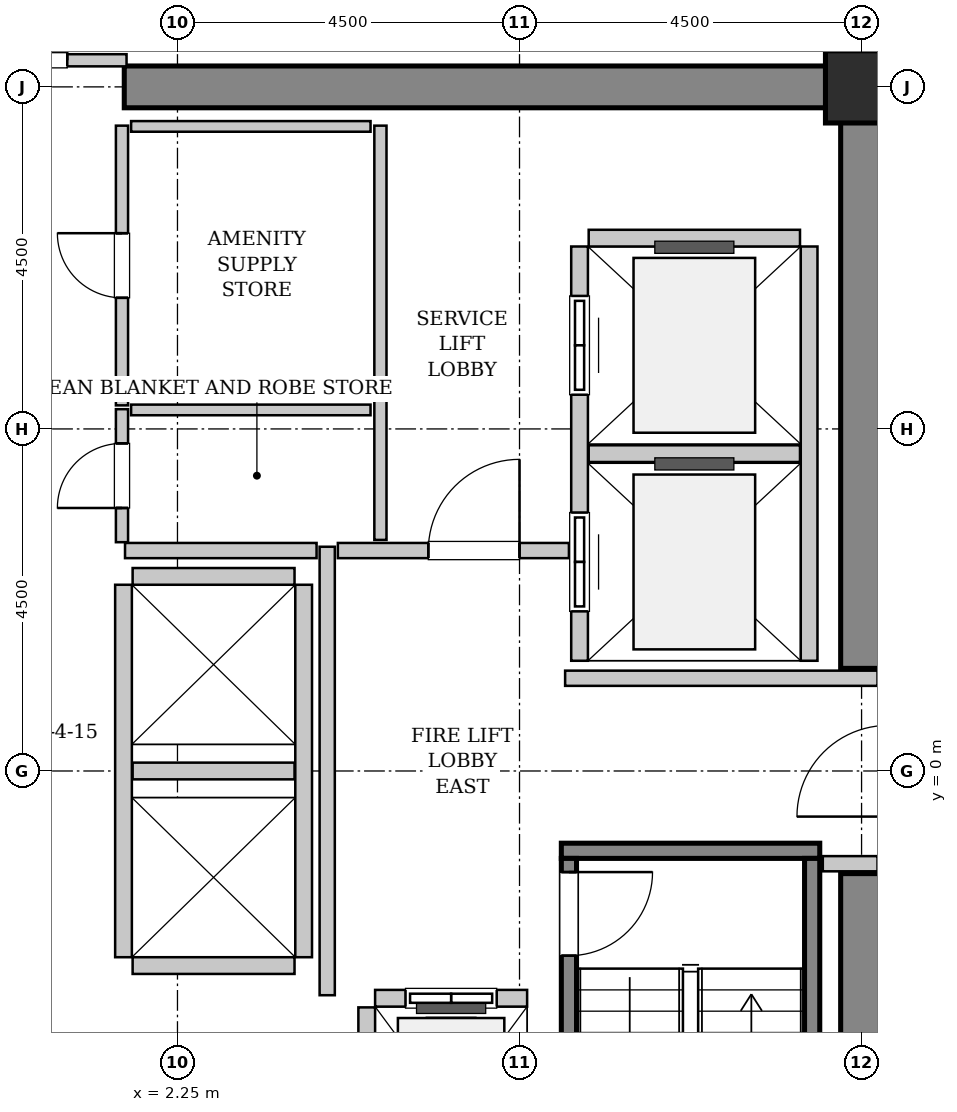
"""IFC4 building model, lengths in metres.
Left out: names, types, materials, properties, quantities, classifications, styles, units other than length and angle.
Written with IfcOpenShell. Run it as: python <this file> out.ifc"""

import sys

from ifc_helpers import new_model, si_unit, direction, frame, frame_2d, origin, origin_2d, place, context, subcontext, project, spatial, rectangle, hollow_rectangle, extrude, source, transform, mapped, element, fill, save


model = new_model("IFC4")
c1 = context("Model", 3, precision=1e-05, world=origin(), true_north=direction((0.0, 1.0)))
c2 = subcontext(c1, "Body", "Model", "MODEL_VIEW")
j1 = project(units=[si_unit("LENGTHUNIT", "METRE"), si_unit("PLANEANGLEUNIT", "RADIAN")], contexts=[c1])
p1 = place(None, origin())
s1 = spatial("IfcSite", under=j1, at=p1, CompositionType="ELEMENT")
p2 = place(p1, origin())
s2 = spatial("IfcBuilding", under=s1, at=p2, CompositionType="ELEMENT")
p3 = place(p2, frame((0.0, 0.0, 156.4)))
s3 = spatial("IfcBuildingStorey", under=s2, at=p3, CompositionType="ELEMENT", Elevation=156.4)
m1 = source(origin(), c2, "Body", "SweptSolid", [
    extrude(rectangle(XDim=9.975, YDim=0.55, at=frame_2d((4.987, 0.0))), origin(), (0.0, 0.0, 1.0), 3.8),
])
p4 = place(p3, frame((1.55, 9.0, 0.0), z_axis=(0.0, 0.0, 1.0), x_axis=(1.0, 0.0, 0.0)))
e1 = element("IfcWall", 1, at=p4, inside=s3, PredefinedType="SHEAR", context=c2, shape_type="MappedRepresentation", body=[
    mapped(m1, transform((0.0, 0.0, 0.0), x_axis=(1.0, 0.0, 0.0), y_axis=(0.0, 1.0, 0.0), z_axis=(0.0, 0.0, 1.0), scale=1.0)),
])
m2 = source(origin(), c2, "Body", "SweptSolid", [
    extrude(rectangle(XDim=7.375, YDim=0.55, at=frame_2d((3.688, 0.0))), origin(), (0.0, 0.0, 1.0), 3.8),
])
for number, where, z_axis, x_axis in (
    (2, (11.25, -8.725, 0.0), (0.0, 0.0, 1.0), (0.0, 1.0, 0.0)),
    (3, (11.25, 1.35, 0.0), (0.0, 0.0, 1.0), (0.0, 1.0, 0.0)),
):
    element("IfcWall", number, at=place(p3, frame(where, z_axis=z_axis, x_axis=x_axis)), inside=s3, PredefinedType="SHEAR", context=c2, shape_type="MappedRepresentation", body=[
        mapped(m2, transform((0.0, 0.0, 0.0), x_axis=(1.0, 0.0, 0.0), y_axis=(0.0, 1.0, 0.0), z_axis=(0.0, 0.0, 1.0), scale=1.0)),
    ])
m3 = source(origin(), c2, "Body", "SweptSolid", [
    extrude(hollow_rectangle(XDim=0.95, YDim=0.95, WallThickness=0.045, InnerFilletRadius=0.045, OuterFilletRadius=0.09, at=origin_2d()), origin(), (0.0, 0.0, 1.0), 3.8),
])
p5 = place(p3, frame((11.25, 9.0, 0.0), z_axis=(0.0, 0.0, 1.0), x_axis=(1.0, 0.0, 0.0)))
e4 = element("IfcColumn", 4, at=p5, inside=s3, PredefinedType="COLUMN", context=c2, shape_type="MappedRepresentation", body=[
    mapped(m3, transform((0.0, 0.0, 0.0), x_axis=(1.0, 0.0, 0.0), y_axis=(0.0, 1.0, 0.0), z_axis=(0.0, 0.0, 1.0), scale=1.0)),
])
m4 = source(origin(), c2, "Body", "SweptSolid", [
    extrude(rectangle(XDim=3.4, YDim=0.2, at=frame_2d((1.7, 0.0))), origin(), (0.0, 0.0, 1.0), 3.8),
])
p6 = place(p3, frame((7.3, -1.05, 0.0), z_axis=(0.0, 0.0, 1.0), x_axis=(1.0, 0.0, 0.0)))
e5 = element("IfcWall", 5, at=p6, inside=s3, PredefinedType="SOLIDWALL", context=c2, shape_type="MappedRepresentation", body=[
    mapped(m4, transform((0.0, 0.0, 0.0), x_axis=(1.0, 0.0, 0.0), y_axis=(0.0, 1.0, 0.0), z_axis=(0.0, 0.0, 1.0), scale=1.0)),
])
m5 = source(origin(), c2, "Body", "SweptSolid", [
    extrude(rectangle(XDim=7.1, YDim=0.2, at=frame_2d((3.55, 0.0))), origin(), (0.0, 0.0, 1.0), 3.8),
])
p7 = place(p3, frame((7.4, -1.15, 0.0), z_axis=(0.0, 0.0, 1.0), x_axis=(0.0, -1.0, 0.0)))
e6 = element("IfcWall", 6, at=p7, inside=s3, PredefinedType="SOLIDWALL", context=c2, shape_type="MappedRepresentation", body=[
    mapped(m5, transform((0.0, 0.0, 0.0), x_axis=(1.0, 0.0, 0.0), y_axis=(0.0, 1.0, 0.0), z_axis=(0.0, 0.0, 1.0), scale=1.0)),
])
p8 = place(p7, frame((0.18, 0.0, 0.0)))
e7 = element("IfcOpeningElement", 7, at=p8, cuts=e6, PredefinedType="OPENING", context=c2, shape_type="SweptSolid", body=[
    extrude(rectangle(XDim=1.1, YDim=2.15, at=frame_2d((0.55, 1.075))), frame((0.0, 0.11, 0.0), z_axis=(0.0, -1.0, 0.0), x_axis=(1.0, 0.0, 0.0)), (0.0, 0.0, 1.0), 0.22),
])
p9 = place(p3, frame((10.6, -1.15, 0.0), z_axis=(0.0, 0.0, 1.0), x_axis=(0.0, -1.0, 0.0)))
e8 = element("IfcWall", 8, at=p9, inside=s3, PredefinedType="SOLIDWALL", context=c2, shape_type="MappedRepresentation", body=[
    mapped(m5, transform((0.0, 0.0, 0.0), x_axis=(1.0, 0.0, 0.0), y_axis=(0.0, 1.0, 0.0), z_axis=(0.0, 0.0, 1.0), scale=1.0)),
])
m6 = source(origin(), c2, "Body", "SweptSolid", [
    extrude(rectangle(XDim=2.0, YDim=0.22, at=frame_2d((1.0, 0.0))), origin(), (0.0, 0.0, 1.0), 3.535),
])
p10 = place(p3, frame((6.85, -2.99, 0.0), z_axis=(0.0, 0.0, 1.0), x_axis=(-1.0, 0.0, 0.0)))
e9 = element("IfcWall", 9, at=p10, inside=s3, PredefinedType="SOLIDWALL", context=c2, shape_type="MappedRepresentation", body=[
    mapped(m6, transform((0.0, 0.0, 0.0), x_axis=(1.0, 0.0, 0.0), y_axis=(0.0, 1.0, 0.0), z_axis=(0.0, 0.0, 1.0), scale=1.0)),
])
p11 = place(p10, frame((0.4, 0.0, 0.0)))
e10 = element("IfcOpeningElement", 10, at=p11, cuts=e9, PredefinedType="OPENING", context=c2, shape_type="SweptSolid", body=[
    extrude(rectangle(XDim=1.2, YDim=2.2, at=frame_2d((0.6, 1.1))), frame((0.0, 0.12, 0.0), z_axis=(0.0, -1.0, 0.0), x_axis=(1.0, 0.0, 0.0)), (0.0, 0.0, 1.0), 0.24),
])
m7 = source(origin(), c2, "Body", "SweptSolid", [
    extrude(rectangle(XDim=2.68, YDim=0.22, at=frame_2d((1.34, 0.0))), origin(), (0.0, 0.0, 1.0), 3.535),
])
p12 = place(p3, frame((4.74, -3.11, 0.0), z_axis=(0.0, 0.0, 1.0), x_axis=(0.0, -1.0, 0.0)))
e11 = element("IfcWall", 11, at=p12, inside=s3, PredefinedType="SOLIDWALL", context=c2, shape_type="MappedRepresentation", body=[
    mapped(m7, transform((0.0, 0.0, 0.0), x_axis=(1.0, 0.0, 0.0), y_axis=(0.0, 1.0, 0.0), z_axis=(0.0, 0.0, 1.0), scale=1.0)),
])
m8 = source(origin(), c2, "Body", "SweptSolid", [
    extrude(rectangle(XDim=5.45, YDim=0.22, at=frame_2d((2.725, 0.0))), origin(), (0.0, 0.0, 1.0), 3.535),
])
p13 = place(p3, frame((7.54, 6.9, 0.0), z_axis=(0.0, 0.0, 1.0), x_axis=(0.0, -1.0, 0.0)))
e12 = element("IfcWall", 12, at=p13, inside=s3, PredefinedType="SOLIDWALL", context=c2, shape_type="MappedRepresentation", body=[
    mapped(m8, transform((0.0, 0.0, 0.0), x_axis=(1.0, 0.0, 0.0), y_axis=(0.0, 1.0, 0.0), z_axis=(0.0, 0.0, 1.0), scale=1.0)),
])
p14 = place(p13, frame((3.5, 0.0, 0.0)))
e13 = element("IfcOpeningElement", 13, at=p14, cuts=e12, PredefinedType="OPENING", context=c2, shape_type="SweptSolid", body=[
    extrude(rectangle(XDim=1.3, YDim=2.3, at=frame_2d((0.65, 1.15))), frame((0.0, 0.12, 0.0), z_axis=(0.0, -1.0, 0.0), x_axis=(1.0, 0.0, 0.0)), (0.0, 0.0, 1.0), 0.24),
])
p15 = place(p13, frame((0.65, 0.0, 0.0)))
e14 = element("IfcOpeningElement", 14, at=p15, cuts=e12, PredefinedType="OPENING", context=c2, shape_type="SweptSolid", body=[
    extrude(rectangle(XDim=1.3, YDim=2.3, at=frame_2d((0.65, 1.15))), frame((0.0, 0.12, 0.0), z_axis=(0.0, -1.0, 0.0), x_axis=(1.0, 0.0, 0.0)), (0.0, 0.0, 1.0), 0.24),
])
p16 = place(p3, frame((10.56, 1.45, 0.0), z_axis=(0.0, 0.0, 1.0), x_axis=(0.0, 1.0, 0.0)))
e15 = element("IfcWall", 15, at=p16, inside=s3, PredefinedType="SOLIDWALL", context=c2, shape_type="MappedRepresentation", body=[
    mapped(m8, transform((0.0, 0.0, 0.0), x_axis=(1.0, 0.0, 0.0), y_axis=(0.0, 1.0, 0.0), z_axis=(0.0, 0.0, 1.0), scale=1.0)),
])
m9 = source(origin(), c2, "Body", "SweptSolid", [
    extrude(rectangle(XDim=2.78, YDim=0.22, at=frame_2d((1.39, 0.0))), origin(), (0.0, 0.0, 1.0), 3.535),
])
for number, where, z_axis, x_axis in (
    (16, (7.66, 4.175, 0.0), (0.0, 0.0, 1.0), (1.0, 0.0, 0.0)),
    (17, (10.44, 7.01, 0.0), (0.0, 0.0, 1.0), (-1.0, 0.0, 0.0)),
):
    element("IfcWall", number, at=place(p3, frame(where, z_axis=z_axis, x_axis=x_axis)), inside=s3, PredefinedType="SOLIDWALL", context=c2, shape_type="MappedRepresentation", body=[
        mapped(m9, transform((0.0, 0.0, 0.0), x_axis=(1.0, 0.0, 0.0), y_axis=(0.0, 1.0, 0.0), z_axis=(0.0, 0.0, 1.0), scale=1.0)),
    ])
m10 = source(origin(), c2, "Body", "SweptSolid", [
    extrude(rectangle(XDim=4.9, YDim=0.22, at=frame_2d((2.45, 0.0))), origin(), (0.0, 0.0, 1.0), 3.535),
])
for number, where, z_axis, x_axis in (
    (18, (1.54, 2.45, 0.0), (0.0, 0.0, 1.0), (0.0, -1.0, 0.0)),
    (19, (3.91, -2.45, 0.0), (0.0, 0.0, 1.0), (0.0, 1.0, 0.0)),
):
    element("IfcWall", number, at=place(p3, frame(where, z_axis=z_axis, x_axis=x_axis)), inside=s3, PredefinedType="SOLIDWALL", context=c2, shape_type="MappedRepresentation", body=[
        mapped(m10, transform((0.0, 0.0, 0.0), x_axis=(1.0, 0.0, 0.0), y_axis=(0.0, 1.0, 0.0), z_axis=(0.0, 0.0, 1.0), scale=1.0)),
    ])
m11 = source(origin(), c2, "Body", "SweptSolid", [
    extrude(rectangle(XDim=2.13, YDim=0.22, at=frame_2d((1.065, 0.0))), origin(), (0.0, 0.0, 1.0), 3.535),
])
for number, where, z_axis, x_axis in (
    (20, (1.66, -2.56, 0.0), (0.0, 0.0, 1.0), (1.0, 0.0, 0.0)),
    (21, (1.66, 0.0, 0.0), (0.0, 0.0, 1.0), (1.0, 0.0, 0.0)),
    (22, (3.79, 2.56, 0.0), (0.0, 0.0, 1.0), (-1.0, 0.0, 0.0)),
):
    element("IfcWall", number, at=place(p3, frame(where, z_axis=z_axis, x_axis=x_axis)), inside=s3, PredefinedType="SOLIDWALL", context=c2, shape_type="MappedRepresentation", body=[
        mapped(m11, transform((0.0, 0.0, 0.0), x_axis=(1.0, 0.0, 0.0), y_axis=(0.0, 1.0, 0.0), z_axis=(0.0, 0.0, 1.0), scale=1.0)),
    ])
m12 = source(origin(), c2, "Body", "SweptSolid", [
    extrude(rectangle(XDim=5.9, YDim=0.2, at=frame_2d((2.95, 0.0))), origin(), (0.0, 0.0, 1.0), 3.535),
])
p17 = place(p3, frame((4.22, -2.95, 0.0), z_axis=(0.0, 0.0, 1.0), x_axis=(0.0, 1.0, 0.0)))
e23 = element("IfcWall", 23, at=p17, inside=s3, PredefinedType="PARTITIONING", context=c2, shape_type="MappedRepresentation", body=[
    mapped(m12, transform((0.0, 0.0, 0.0), x_axis=(1.0, 0.0, 0.0), y_axis=(0.0, 1.0, 0.0), z_axis=(0.0, 0.0, 1.0), scale=1.0)),
])
m13 = source(origin(), c2, "Body", "SweptSolid", [
    extrude(rectangle(XDim=2.52, YDim=0.2, at=frame_2d((1.26, 0.0))), origin(), (0.0, 0.0, 1.0), 3.535),
])
p18 = place(p3, frame((1.56, 2.9, 0.0), z_axis=(0.0, 0.0, 1.0), x_axis=(1.0, 0.0, 0.0)))
e24 = element("IfcWall", 24, at=p18, inside=s3, PredefinedType="PARTITIONING", context=c2, shape_type="MappedRepresentation", body=[
    mapped(m13, transform((0.0, 0.0, 0.0), x_axis=(1.0, 0.0, 0.0), y_axis=(0.0, 1.0, 0.0), z_axis=(0.0, 0.0, 1.0), scale=1.0)),
])
m14 = source(origin(), c2, "Body", "SweptSolid", [
    extrude(rectangle(XDim=3.04, YDim=0.2, at=frame_2d((1.52, 0.0))), origin(), (0.0, 0.0, 1.0), 3.535),
])
p19 = place(p3, frame((4.36, 2.9, 0.0), z_axis=(0.0, 0.0, 1.0), x_axis=(1.0, 0.0, 0.0)))
e25 = element("IfcWall", 25, at=p19, inside=s3, PredefinedType="PARTITIONING", context=c2, shape_type="MappedRepresentation", body=[
    mapped(m14, transform((0.0, 0.0, 0.0), x_axis=(1.0, 0.0, 0.0), y_axis=(0.0, 1.0, 0.0), z_axis=(0.0, 0.0, 1.0), scale=1.0)),
])
p20 = place(p19, frame((1.19, 0.0, 0.0)))
e26 = element("IfcOpeningElement", 26, at=p20, cuts=e25, PredefinedType="OPENING", context=c2, shape_type="SweptSolid", body=[
    extrude(rectangle(XDim=1.2, YDim=2.15, at=frame_2d((0.6, 1.075))), frame((0.0, 0.11, 0.0), z_axis=(0.0, -1.0, 0.0), x_axis=(1.0, 0.0, 0.0)), (0.0, 0.0, 1.0), 0.22),
])
m15 = source(origin(), c2, "Body", "SweptSolid", [
    extrude(rectangle(XDim=4.11, YDim=0.2, at=frame_2d((2.055, 0.0))), origin(), (0.0, 0.0, 1.0), 3.535),
])
p21 = place(p3, frame((7.35, 1.22, 0.0), z_axis=(0.0, 0.0, 1.0), x_axis=(1.0, 0.0, 0.0)))
e27 = element("IfcWall", 27, at=p21, inside=s3, PredefinedType="PARTITIONING", context=c2, shape_type="MappedRepresentation", body=[
    mapped(m15, transform((0.0, 0.0, 0.0), x_axis=(1.0, 0.0, 0.0), y_axis=(0.0, 1.0, 0.0), z_axis=(0.0, 0.0, 1.0), scale=1.0)),
])
m16 = source(origin(), c2, "Body", "SweptSolid", [
    extrude(rectangle(XDim=0.72, YDim=0.2, at=frame_2d((0.36, 0.0))), origin(), (0.0, 0.0, 1.0), 3.535),
])
p22 = place(p3, frame((10.74, -1.22, 0.0), z_axis=(0.0, 0.0, 1.0), x_axis=(1.0, 0.0, 0.0)))
e28 = element("IfcWall", 28, at=p22, inside=s3, PredefinedType="PARTITIONING", context=c2, shape_type="MappedRepresentation", body=[
    mapped(m16, transform((0.0, 0.0, 0.0), x_axis=(1.0, 0.0, 0.0), y_axis=(0.0, 1.0, 0.0), z_axis=(0.0, 0.0, 1.0), scale=1.0)),
])
m17 = source(origin(), c2, "Body", "SweptSolid", [
    extrude(rectangle(XDim=3.16, YDim=0.16, at=frame_2d((1.58, 0.0))), origin(), (0.0, 0.0, 1.0), 2.425),
])
p23 = place(p3, frame((-1.58, 9.35, 0.0), z_axis=(0.0, 0.0, 1.0), x_axis=(1.0, 0.0, 0.0)))
e29 = element("IfcWall", 29, at=p23, inside=s3, PredefinedType="PARTITIONING", context=c2, shape_type="MappedRepresentation", body=[
    mapped(m17, transform((0.0, 0.0, 0.0), x_axis=(1.0, 0.0, 0.0), y_axis=(0.0, 1.0, 0.0), z_axis=(0.0, 0.0, 1.0), scale=1.0)),
])
p24 = place(p23, frame((0.78, 0.0, 0.0)))
e30 = element("IfcOpeningElement", 30, at=p24, cuts=e29, PredefinedType="OPENING", context=c2, shape_type="SweptSolid", body=[
    extrude(rectangle(XDim=1.6, YDim=2.3, at=frame_2d((0.8, 1.15))), frame((0.0, 0.09, 0.0), z_axis=(0.0, -1.0, 0.0), x_axis=(1.0, 0.0, 0.0)), (0.0, 0.0, 1.0), 0.18),
])
m18 = source(origin(), c2, "Body", "SweptSolid", [
    extrude(rectangle(XDim=5.45, YDim=0.16, at=frame_2d((2.725, 0.0))), origin(), (0.0, 0.0, 1.0), 3.535),
])
p25 = place(p3, frame((4.92, 3.04, 0.0), z_axis=(0.0, 0.0, 1.0), x_axis=(0.0, 1.0, 0.0)))
e31 = element("IfcWall", 31, at=p25, inside=s3, PredefinedType="PARTITIONING", context=c2, shape_type="MappedRepresentation", body=[
    mapped(m18, transform((0.0, 0.0, 0.0), x_axis=(1.0, 0.0, 0.0), y_axis=(0.0, 1.0, 0.0), z_axis=(0.0, 0.0, 1.0), scale=1.0)),
])
m19 = source(origin(), c2, "Body", "SweptSolid", [
    extrude(rectangle(XDim=1.75, YDim=0.16, at=frame_2d((0.875, 0.0))), origin(), (0.0, 0.0, 1.0), 3.535),
])
p26 = place(p3, frame((1.52, 3.01, 0.0), z_axis=(0.0, 0.0, 1.0), x_axis=(0.0, 1.0, 0.0)))
e32 = element("IfcWall", 32, at=p26, inside=s3, PredefinedType="PARTITIONING", context=c2, shape_type="MappedRepresentation", body=[
    mapped(m19, transform((0.0, 0.0, 0.0), x_axis=(1.0, 0.0, 0.0), y_axis=(0.0, 1.0, 0.0), z_axis=(0.0, 0.0, 1.0), scale=1.0)),
])
p27 = place(p26, frame((0.45, 0.0, 0.0)))
e33 = element("IfcOpeningElement", 33, at=p27, cuts=e32, PredefinedType="OPENING", context=c2, shape_type="SweptSolid", body=[
    extrude(rectangle(XDim=0.85, YDim=2.1, at=frame_2d((0.425, 1.05))), frame((0.0, 0.09, 0.0), z_axis=(0.0, -1.0, 0.0), x_axis=(1.0, 0.0, 0.0)), (0.0, 0.0, 1.0), 0.18),
])
m20 = source(origin(), c2, "Body", "SweptSolid", [
    extrude(rectangle(XDim=3.15, YDim=0.14, at=frame_2d((1.575, 0.0))), origin(), (0.0, 0.0, 1.0), 3.535),
])
p28 = place(p3, frame((1.64, 4.75, 0.0), z_axis=(0.0, 0.0, 1.0), x_axis=(1.0, 0.0, 0.0)))
e34 = element("IfcWall", 34, at=p28, inside=s3, PredefinedType="PARTITIONING", context=c2, shape_type="MappedRepresentation", body=[
    mapped(m20, transform((0.0, 0.0, 0.0), x_axis=(1.0, 0.0, 0.0), y_axis=(0.0, 1.0, 0.0), z_axis=(0.0, 0.0, 1.0), scale=1.0)),
])
m21 = source(origin(), c2, "Body", "SweptSolid", [
    extrude(rectangle(XDim=3.68, YDim=0.16, at=frame_2d((1.84, 0.0))), origin(), (0.0, 0.0, 1.0), 3.535),
])
p29 = place(p3, frame((1.52, 4.81, 0.0), z_axis=(0.0, 0.0, 1.0), x_axis=(0.0, 1.0, 0.0)))
e35 = element("IfcWall", 35, at=p29, inside=s3, PredefinedType="PARTITIONING", context=c2, shape_type="MappedRepresentation", body=[
    mapped(m21, transform((0.0, 0.0, 0.0), x_axis=(1.0, 0.0, 0.0), y_axis=(0.0, 1.0, 0.0), z_axis=(0.0, 0.0, 1.0), scale=1.0)),
])
p30 = place(p29, frame((1.415, 0.0, 0.0)))
e36 = element("IfcOpeningElement", 36, at=p30, cuts=e35, PredefinedType="OPENING", context=c2, shape_type="SweptSolid", body=[
    extrude(rectangle(XDim=0.85, YDim=2.1, at=frame_2d((0.425, 1.05))), frame((0.0, 0.09, 0.0), z_axis=(0.0, -1.0, 0.0), x_axis=(1.0, 0.0, 0.0)), (0.0, 0.0, 1.0), 0.18),
])
p31 = place(p3, frame((1.64, 8.48, 0.0), z_axis=(0.0, 0.0, 1.0), x_axis=(1.0, 0.0, 0.0)))
e37 = element("IfcWall", 37, at=p31, inside=s3, PredefinedType="PARTITIONING", context=c2, shape_type="MappedRepresentation", body=[
    mapped(m20, transform((0.0, 0.0, 0.0), x_axis=(1.0, 0.0, 0.0), y_axis=(0.0, 1.0, 0.0), z_axis=(0.0, 0.0, 1.0), scale=1.0)),
])
m22 = source(origin(), c2, "Body", "SweptSolid", [
    extrude(rectangle(XDim=1.1, YDim=2.15, at=frame_2d((0.55, 1.075))), frame((0.0, 0.025, 0.0), z_axis=(0.0, -1.0, 0.0), x_axis=(1.0, 0.0, 0.0)), (0.0, 0.0, 1.0), 0.05),
])
p32 = place(p8, origin())
e38 = element("IfcDoor", 38, at=p32, inside=s3, OperationType="SINGLE_SWING_LEFT", PredefinedType="DOOR", context=c2, shape_type="MappedRepresentation", body=[
    mapped(m22, transform((0.0, 0.0, 0.0), x_axis=(1.0, 0.0, 0.0), y_axis=(0.0, 1.0, 0.0), z_axis=(0.0, 0.0, 1.0), scale=1.0)),
])
fill(e7, e38)
m23 = source(origin(), c2, "Body", "SweptSolid", [
    extrude(rectangle(XDim=1.2, YDim=2.2, at=frame_2d((0.6, 1.1))), frame((0.0, 0.025, 0.0), z_axis=(0.0, -1.0, 0.0), x_axis=(1.0, 0.0, 0.0)), (0.0, 0.0, 1.0), 0.05),
])
p33 = place(p11, origin())
e39 = element("IfcDoor", 39, at=p33, inside=s3, OperationType="SLIDING_TO_LEFT", PredefinedType="DOOR", context=c2, shape_type="MappedRepresentation", body=[
    mapped(m23, transform((0.0, 0.0, 0.0), x_axis=(1.0, 0.0, 0.0), y_axis=(0.0, 1.0, 0.0), z_axis=(0.0, 0.0, 1.0), scale=1.0)),
])
fill(e10, e39)
m24 = source(origin(), c2, "Body", "SweptSolid", [
    extrude(rectangle(XDim=1.3, YDim=2.3, at=frame_2d((0.65, 1.15))), frame((0.0, 0.025, 0.0), z_axis=(0.0, -1.0, 0.0), x_axis=(1.0, 0.0, 0.0)), (0.0, 0.0, 1.0), 0.05),
])
p34 = place(p14, origin())
e40 = element("IfcDoor", 40, at=p34, inside=s3, OperationType="SLIDING_TO_RIGHT", PredefinedType="DOOR", context=c2, shape_type="MappedRepresentation", body=[
    mapped(m24, transform((0.0, 0.0, 0.0), x_axis=(1.0, 0.0, 0.0), y_axis=(0.0, 1.0, 0.0), z_axis=(0.0, 0.0, 1.0), scale=1.0)),
])
fill(e13, e40)
p35 = place(p15, origin())
e41 = element("IfcDoor", 41, at=p35, inside=s3, OperationType="SLIDING_TO_RIGHT", PredefinedType="DOOR", context=c2, shape_type="MappedRepresentation", body=[
    mapped(m24, transform((0.0, 0.0, 0.0), x_axis=(1.0, 0.0, 0.0), y_axis=(0.0, 1.0, 0.0), z_axis=(0.0, 0.0, 1.0), scale=1.0)),
])
fill(e14, e41)
m25 = source(origin(), c2, "Body", "SweptSolid", [
    extrude(rectangle(XDim=1.2, YDim=2.15, at=frame_2d((0.6, 1.075))), frame((0.0, 0.025, 0.0), z_axis=(0.0, -1.0, 0.0), x_axis=(1.0, 0.0, 0.0)), (0.0, 0.0, 1.0), 0.05),
])
p36 = place(p20, origin())
e42 = element("IfcDoor", 42, at=p36, inside=s3, OperationType="SINGLE_SWING_RIGHT", PredefinedType="DOOR", context=c2, shape_type="MappedRepresentation", body=[
    mapped(m25, transform((0.0, 0.0, 0.0), x_axis=(1.0, 0.0, 0.0), y_axis=(0.0, 1.0, 0.0), z_axis=(0.0, 0.0, 1.0), scale=1.0)),
])
fill(e26, e42)
m26 = source(origin(), c2, "Body", "SweptSolid", [
    extrude(rectangle(XDim=1.6, YDim=2.3, at=frame_2d((0.8, 1.15))), frame((0.0, 0.025, 0.0), z_axis=(0.0, -1.0, 0.0), x_axis=(1.0, 0.0, 0.0)), (0.0, 0.0, 1.0), 0.05),
])
p37 = place(p24, origin())
e43 = element("IfcDoor", 43, at=p37, inside=s3, OperationType="DOUBLE_DOOR_SINGLE_SWING", PredefinedType="DOOR", context=c2, shape_type="MappedRepresentation", body=[
    mapped(m26, transform((0.0, 0.0, 0.0), x_axis=(1.0, 0.0, 0.0), y_axis=(0.0, 1.0, 0.0), z_axis=(0.0, 0.0, 1.0), scale=1.0)),
])
fill(e30, e43)
m27 = source(origin(), c2, "Body", "SweptSolid", [
    extrude(rectangle(XDim=0.85, YDim=2.1, at=frame_2d((0.425, 1.05))), frame((0.0, 0.025, 0.0), z_axis=(0.0, -1.0, 0.0), x_axis=(1.0, 0.0, 0.0)), (0.0, 0.0, 1.0), 0.05),
])
p38 = place(p27, origin())
e44 = element("IfcDoor", 44, at=p38, inside=s3, OperationType="SINGLE_SWING_LEFT", PredefinedType="DOOR", context=c2, shape_type="MappedRepresentation", body=[
    mapped(m27, transform((0.0, 0.0, 0.0), x_axis=(1.0, 0.0, 0.0), y_axis=(0.0, 1.0, 0.0), z_axis=(0.0, 0.0, 1.0), scale=1.0)),
])
fill(e33, e44)
p39 = place(p30, origin())
e45 = element("IfcDoor", 45, at=p39, inside=s3, OperationType="SINGLE_SWING_RIGHT", PredefinedType="DOOR", context=c2, shape_type="MappedRepresentation", body=[
    mapped(m27, transform((0.0, 0.0, 0.0), x_axis=(1.0, 0.0, 0.0), y_axis=(0.0, 1.0, 0.0), z_axis=(0.0, 0.0, 1.0), scale=1.0)),
])
fill(e36, e45)
save(model, sys.argv[1])
